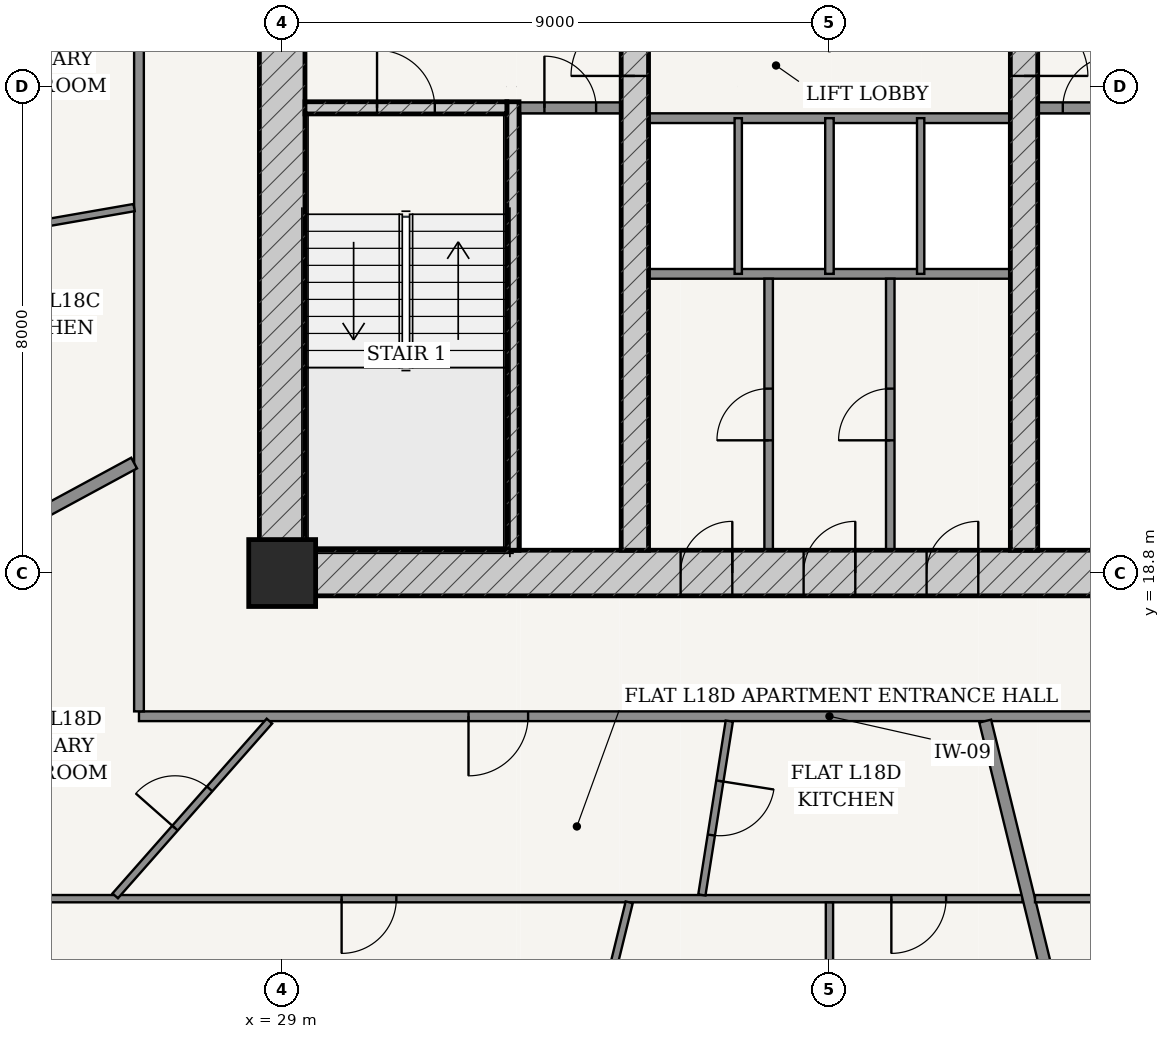
"""IFC4 building model, lengths in metres.
Left out: names, types, materials, properties, quantities, classifications, styles, units other than length and angle.
Written with IfcOpenShell. Run it as: python <this file> out.ifc"""

import sys

from ifc_helpers import new_model, si_unit, direction, frame, frame_2d, origin, origin_2d, place, context, subcontext, project, spatial, rectangle, extrude, source, transform, mapped, element, fill, save


model = new_model("IFC4")
c1 = context("Model", 3, precision=1e-05, world=origin(), true_north=direction((-0.2419218956, 0.970295726276)))
c2 = subcontext(c1, "Body", "Model", "MODEL_VIEW")
j1 = project(units=[si_unit("LENGTHUNIT", "METRE"), si_unit("PLANEANGLEUNIT", "RADIAN")], contexts=[c1])
p1 = place(None, origin())
s1 = spatial("IfcSite", under=j1, at=p1, CompositionType="ELEMENT")
p2 = place(p1, origin())
s2 = spatial("IfcBuilding", under=s1, at=p2, CompositionType="ELEMENT")
p3 = place(p2, frame((0.0, 0.0, 70.8)))
s3 = spatial("IfcBuildingStorey", under=s2, at=p3, CompositionType="ELEMENT", Elevation=70.8)
p4 = place(p3, frame((29.0, 18.8, 0.0), z_axis=(0.0, 0.0, 1.0), x_axis=(1.0, 0.0, 0.0)))
e1 = element("IfcColumn", 1, at=p4, inside=s3, PredefinedType="COLUMN", context=c2, shape_type="SweptSolid", body=[
    extrude(rectangle(XDim=1.1, YDim=1.1, at=origin_2d()), origin(), (0.0, 0.0, 1.0), 3.6),
])
p5 = place(p3, frame((28.625, 18.8, 0.0), z_axis=(0.0, 0.0, 1.0), x_axis=(1.0, 0.0, 0.0)))
e2 = element("IfcWall", 2, at=p5, inside=s3, PredefinedType="SHEAR", context=c2, shape_type="SweptSolid", body=[
    extrude(rectangle(XDim=18.75, YDim=0.75, at=frame_2d((9.375, 0.0))), origin(), (0.0, 0.0, 1.0), 3.15),
])
p6 = place(p5, frame((6.927, 0.0, 0.0)))
e3 = element("IfcOpeningElement", 3, at=p6, cuts=e2, PredefinedType="OPENING", context=c2, shape_type="SweptSolid", body=[
    extrude(rectangle(XDim=0.85, YDim=2.1, at=frame_2d((0.425, 1.05))), frame((0.0, 0.385, 0.0), z_axis=(0.0, -1.0, 0.0), x_axis=(1.0, 0.0, 0.0)), (0.0, 0.0, 1.0), 0.77),
])
p7 = place(p5, frame((8.95, 0.0, 0.0)))
e4 = element("IfcOpeningElement", 4, at=p7, cuts=e2, PredefinedType="OPENING", context=c2, shape_type="SweptSolid", body=[
    extrude(rectangle(XDim=0.85, YDim=2.1, at=frame_2d((0.425, 1.05))), frame((0.0, 0.385, 0.0), z_axis=(0.0, -1.0, 0.0), x_axis=(1.0, 0.0, 0.0)), (0.0, 0.0, 1.0), 0.77),
])
p8 = place(p5, frame((10.972, 0.0, 0.0)))
e5 = element("IfcOpeningElement", 5, at=p8, cuts=e2, PredefinedType="OPENING", context=c2, shape_type="SweptSolid", body=[
    extrude(rectangle(XDim=0.85, YDim=2.1, at=frame_2d((0.425, 1.05))), frame((0.0, 0.385, 0.0), z_axis=(0.0, -1.0, 0.0), x_axis=(1.0, 0.0, 0.0)), (0.0, 0.0, 1.0), 0.77),
])
p9 = place(p3, frame((29.0, 19.175, 0.0), z_axis=(0.0, 0.0, 1.0), x_axis=(0.0, 1.0, 0.0)))
e6 = element("IfcWall", 6, at=p9, inside=s3, PredefinedType="SHEAR", context=c2, shape_type="SweptSolid", body=[
    extrude(rectangle(XDim=15.25, YDim=0.75, at=frame_2d((7.625, 0.0))), origin(), (0.0, 0.0, 1.0), 3.15),
])
p10 = place(p9, frame((9.875, 0.0, 0.0)))
e7 = element("IfcOpeningElement", 7, at=p10, cuts=e6, PredefinedType="OPENING", context=c2, shape_type="SweptSolid", body=[
    extrude(rectangle(XDim=1.5, YDim=2.2, at=frame_2d((0.75, 1.1))), frame((0.0, 0.385, 0.0), z_axis=(0.0, -1.0, 0.0), x_axis=(1.0, 0.0, 0.0)), (0.0, 0.0, 1.0), 0.77),
])
p11 = place(p3, frame((32.795, 19.175, 0.0), z_axis=(0.0, 0.0, 1.0), x_axis=(0.0, 1.0, 0.0)))
e8 = element("IfcWall", 8, at=p11, inside=s3, PredefinedType="SOLIDWALL", context=c2, shape_type="SweptSolid", body=[
    extrude(rectangle(XDim=7.375, YDim=0.2, at=frame_2d((3.688, 0.0))), origin(), (0.0, 0.0, 1.0), 3.15),
])
p12 = place(p3, frame((29.375, 26.45, 0.0), z_axis=(0.0, 0.0, 1.0), x_axis=(1.0, 0.0, 0.0)))
e9 = element("IfcWall", 9, at=p12, inside=s3, PredefinedType="SOLIDWALL", context=c2, shape_type="SweptSolid", body=[
    extrude(rectangle(XDim=3.32, YDim=0.2, at=frame_2d((1.66, 0.0))), origin(), (0.0, 0.0, 1.0), 3.15),
])
p13 = place(p12, frame((1.185, 0.0, 0.0)))
e10 = element("IfcOpeningElement", 10, at=p13, cuts=e9, PredefinedType="OPENING", context=c2, shape_type="SweptSolid", body=[
    extrude(rectangle(XDim=0.95, YDim=2.15, at=frame_2d((0.475, 1.075))), frame((0.0, 0.11, 0.0), z_axis=(0.0, -1.0, 0.0), x_axis=(1.0, 0.0, 0.0)), (0.0, 0.0, 1.0), 0.22),
])
p14 = place(p3, frame((34.8, 19.175, 0.0), z_axis=(0.0, 0.0, 1.0), x_axis=(0.0, 1.0, 0.0)))
e11 = element("IfcWall", 11, at=p14, inside=s3, PredefinedType="SHEAR", context=c2, shape_type="SweptSolid", body=[
    extrude(rectangle(XDim=15.25, YDim=0.45, at=frame_2d((7.625, 0.0))), origin(), (0.0, 0.0, 1.0), 3.15),
])
p15 = place(p14, frame((7.8, 0.0, 0.0)))
e12 = element("IfcOpeningElement", 12, at=p15, cuts=e11, PredefinedType="OPENING", context=c2, shape_type="SweptSolid", body=[
    extrude(rectangle(XDim=1.05, YDim=2.15, at=frame_2d((0.525, 1.075))), frame((0.0, 0.235, 0.0), z_axis=(0.0, -1.0, 0.0), x_axis=(1.0, 0.0, 0.0)), (0.0, 0.0, 1.0), 0.47),
])
p16 = place(p3, frame((41.2, 19.175, 0.0), z_axis=(0.0, 0.0, 1.0), x_axis=(0.0, 1.0, 0.0)))
e13 = element("IfcWall", 13, at=p16, inside=s3, PredefinedType="SHEAR", context=c2, shape_type="SweptSolid", body=[
    extrude(rectangle(XDim=15.25, YDim=0.45, at=frame_2d((7.625, 0.0))), origin(), (0.0, 0.0, 1.0), 3.15),
])
p17 = place(p16, frame((7.8, 0.0, 0.0)))
e14 = element("IfcOpeningElement", 14, at=p17, cuts=e13, PredefinedType="OPENING", context=c2, shape_type="SweptSolid", body=[
    extrude(rectangle(XDim=1.05, YDim=2.15, at=frame_2d((0.525, 1.075))), frame((0.0, 0.235, 0.0), z_axis=(0.0, -1.0, 0.0), x_axis=(1.0, 0.0, 0.0)), (0.0, 0.0, 1.0), 0.47),
])
p18 = place(p3, frame((32.9, 26.45, 0.0), z_axis=(0.0, 0.0, 1.0), x_axis=(1.0, 0.0, 0.0)))
e15 = element("IfcWall", 15, at=p18, inside=s3, PredefinedType="PARTITIONING", context=c2, shape_type="SweptSolid", body=[
    extrude(rectangle(XDim=1.675, YDim=0.18, at=frame_2d((0.837, 0.0))), origin(), (0.0, 0.0, 1.0), 3.15),
])
p19 = place(p18, frame((0.413, 0.0, 0.0)))
e16 = element("IfcOpeningElement", 16, at=p19, cuts=e15, PredefinedType="OPENING", context=c2, shape_type="SweptSolid", body=[
    extrude(rectangle(XDim=0.85, YDim=2.1, at=frame_2d((0.425, 1.05))), frame((0.0, 0.1, 0.0), z_axis=(0.0, -1.0, 0.0), x_axis=(1.0, 0.0, 0.0)), (0.0, 0.0, 1.0), 0.2),
])
p20 = place(p3, frame((41.425, 26.45, 0.0), z_axis=(0.0, 0.0, 1.0), x_axis=(1.0, 0.0, 0.0)))
e17 = element("IfcWall", 17, at=p20, inside=s3, PredefinedType="PARTITIONING", context=c2, shape_type="SweptSolid", body=[
    extrude(rectangle(XDim=1.675, YDim=0.18, at=frame_2d((0.837, 0.0))), origin(), (0.0, 0.0, 1.0), 3.15),
])
p21 = place(p20, frame((0.413, 0.0, 0.0)))
e18 = element("IfcOpeningElement", 18, at=p21, cuts=e17, PredefinedType="OPENING", context=c2, shape_type="SweptSolid", body=[
    extrude(rectangle(XDim=0.85, YDim=2.1, at=frame_2d((0.425, 1.05))), frame((0.0, 0.1, 0.0), z_axis=(0.0, -1.0, 0.0), x_axis=(1.0, 0.0, 0.0)), (0.0, 0.0, 1.0), 0.2),
])
for number, where, z_axis, x_axis in (
    (19, (35.025, 26.28, 0.0), (0.0, 0.0, 1.0), (1.0, 0.0, 0.0)),
    (20, (35.025, 23.72, 0.0), (0.0, 0.0, 1.0), (1.0, 0.0, 0.0)),
):
    element("IfcWall", number, at=place(p3, frame(where, z_axis=z_axis, x_axis=x_axis)), inside=s3, PredefinedType="PARTITIONING", context=c2, shape_type="SweptSolid", body=[
        extrude(rectangle(XDim=5.95, YDim=0.16, at=frame_2d((2.975, 0.0))), origin(), (0.0, 0.0, 1.0), 3.15),
    ])
p22 = place(p3, frame((36.5, 23.72, 0.0), z_axis=(0.0, 0.0, 1.0), x_axis=(0.0, 1.0, 0.0)))
e21 = element("IfcWall", 21, at=p22, inside=s3, PredefinedType="PARTITIONING", context=c2, shape_type="SweptSolid", body=[
    extrude(rectangle(XDim=2.56, YDim=0.12, at=frame_2d((1.28, 0.0))), origin(), (0.0, 0.0, 1.0), 3.15),
])
p23 = place(p3, frame((38.0, 23.72, 0.0), z_axis=(0.0, 0.0, 1.0), x_axis=(0.0, 1.0, 0.0)))
e22 = element("IfcWall", 22, at=p23, inside=s3, PredefinedType="PARTITIONING", context=c2, shape_type="SweptSolid", body=[
    extrude(rectangle(XDim=2.56, YDim=0.14, at=frame_2d((1.28, 0.0))), origin(), (0.0, 0.0, 1.0), 3.15),
])
p24 = place(p3, frame((39.5, 23.72, 0.0), z_axis=(0.0, 0.0, 1.0), x_axis=(0.0, 1.0, 0.0)))
e23 = element("IfcWall", 23, at=p24, inside=s3, PredefinedType="PARTITIONING", context=c2, shape_type="SweptSolid", body=[
    extrude(rectangle(XDim=2.56, YDim=0.12, at=frame_2d((1.28, 0.0))), origin(), (0.0, 0.0, 1.0), 3.15),
])
p25 = place(p3, frame((37.0, 19.175, 0.0), z_axis=(0.0, 0.0, 1.0), x_axis=(0.0, 1.0, 0.0)))
e24 = element("IfcWall", 24, at=p25, inside=s3, PredefinedType="PARTITIONING", context=c2, shape_type="SweptSolid", body=[
    extrude(rectangle(XDim=4.465, YDim=0.14, at=frame_2d((2.232, 0.0))), origin(), (0.0, 0.0, 1.0), 3.15),
])
p26 = place(p25, frame((1.808, 0.0, 0.0)))
e25 = element("IfcOpeningElement", 25, at=p26, cuts=e24, PredefinedType="OPENING", context=c2, shape_type="SweptSolid", body=[
    extrude(rectangle(XDim=0.85, YDim=2.1, at=frame_2d((0.425, 1.05))), frame((0.0, 0.08, 0.0), z_axis=(0.0, -1.0, 0.0), x_axis=(1.0, 0.0, 0.0)), (0.0, 0.0, 1.0), 0.16),
])
p27 = place(p3, frame((39.0, 19.175, 0.0), z_axis=(0.0, 0.0, 1.0), x_axis=(0.0, 1.0, 0.0)))
e26 = element("IfcWall", 26, at=p27, inside=s3, PredefinedType="PARTITIONING", context=c2, shape_type="SweptSolid", body=[
    extrude(rectangle(XDim=4.465, YDim=0.14, at=frame_2d((2.232, 0.0))), origin(), (0.0, 0.0, 1.0), 3.15),
])
p28 = place(p27, frame((1.808, 0.0, 0.0)))
e27 = element("IfcOpeningElement", 27, at=p28, cuts=e26, PredefinedType="OPENING", context=c2, shape_type="SweptSolid", body=[
    extrude(rectangle(XDim=0.85, YDim=2.1, at=frame_2d((0.425, 1.05))), frame((0.0, 0.08, 0.0), z_axis=(0.0, -1.0, 0.0), x_axis=(1.0, 0.0, 0.0)), (0.0, 0.0, 1.0), 0.16),
])
p29 = place(p3, frame((26.645, 16.445, 0.0), z_axis=(0.0, 0.0, 1.0), x_axis=(1.0, 0.0, 0.0)))
e28 = element("IfcWall", 28, at=p29, inside=s3, PredefinedType="PARTITIONING", context=c2, shape_type="SweptSolid", body=[
    extrude(rectangle(XDim=22.71, YDim=0.16, at=frame_2d((11.355, 0.0))), origin(), (0.0, 0.0, 1.0), 2.596),
])
p30 = place(p29, frame((5.419, 0.0, 0.0)))
e29 = element("IfcOpeningElement", 29, at=p30, cuts=e28, PredefinedType="OPENING", context=c2, shape_type="SweptSolid", body=[
    extrude(rectangle(XDim=0.98, YDim=2.2, at=frame_2d((0.49, 1.1))), frame((0.0, 0.09, 0.0), z_axis=(0.0, -1.0, 0.0), x_axis=(1.0, 0.0, 0.0)), (0.0, 0.0, 1.0), 0.18),
])
p31 = place(p3, frame((26.645, 16.525, 0.0), z_axis=(0.0, 0.0, 1.0), x_axis=(0.0, 1.0, 0.0)))
e30 = element("IfcWall", 30, at=p31, inside=s3, PredefinedType="PARTITIONING", context=c2, shape_type="SweptSolid", body=[
    extrude(rectangle(XDim=20.55, YDim=0.16, at=frame_2d((10.275, 0.0))), origin(), (0.0, 0.0, 1.0), 2.596),
])
p32 = place(p31, frame((16.199, 0.0, 0.0)))
e31 = element("IfcOpeningElement", 31, at=p32, cuts=e30, PredefinedType="OPENING", context=c2, shape_type="SweptSolid", body=[
    extrude(rectangle(XDim=0.98, YDim=2.2, at=frame_2d((0.49, 1.1))), frame((0.0, 0.09, 0.0), z_axis=(0.0, -1.0, 0.0), x_axis=(1.0, 0.0, 0.0)), (0.0, 0.0, 1.0), 0.18),
])
p33 = place(p3, frame((26.565, 24.81, 0.0), z_axis=(0.0, 0.0, 1.0), x_axis=(-0.985190752909, -0.171461891924, 0.0)))
e32 = element("IfcWall", 32, at=p33, inside=s3, PredefinedType="PARTITIONING", context=c2, shape_type="SweptSolid", body=[
    extrude(rectangle(XDim=2.902, YDim=0.12, at=frame_2d((1.451, 0.0))), origin(), (0.0, 0.0, 1.0), 2.596),
])
p34 = place(p3, frame((26.565, 20.608, 0.0), z_axis=(0.0, 0.0, 1.0), x_axis=(-0.879369737803, -0.476139542819, 0.0)))
e33 = element("IfcWall", 33, at=p34, inside=s3, PredefinedType="PARTITIONING", context=c2, shape_type="SweptSolid", body=[
    extrude(rectangle(XDim=14.295, YDim=0.2, at=frame_2d((7.147, 0.0))), origin(), (0.0, 0.0, 1.0), 2.5),
])
p35 = place(p3, frame((41.176, 13.445, 0.0), z_axis=(0.0, 0.0, 1.0), x_axis=(-1.0, 0.0, 0.0)))
e34 = element("IfcWall", 34, at=p35, inside=s3, PredefinedType="PARTITIONING", context=c2, shape_type="SweptSolid", body=[
    extrude(rectangle(XDim=17.531, YDim=0.12, at=frame_2d((8.766, 0.0))), origin(), (0.0, 0.0, 1.0), 2.596),
])
p36 = place(p35, frame((10.299, 0.0, 0.0)))
e35 = element("IfcOpeningElement", 35, at=p36, cuts=e34, PredefinedType="OPENING", context=c2, shape_type="SweptSolid", body=[
    extrude(rectangle(XDim=0.9, YDim=2.15, at=frame_2d((0.45, 1.075))), frame((0.0, 0.07, 0.0), z_axis=(0.0, -1.0, 0.0), x_axis=(1.0, 0.0, 0.0)), (0.0, 0.0, 1.0), 0.14),
])
p37 = place(p35, frame((1.258, 0.0, 0.0)))
e36 = element("IfcOpeningElement", 36, at=p37, cuts=e34, PredefinedType="OPENING", context=c2, shape_type="SweptSolid", body=[
    extrude(rectangle(XDim=0.9, YDim=2.15, at=frame_2d((0.45, 1.075))), frame((0.0, 0.07, 0.0), z_axis=(0.0, -1.0, 0.0), x_axis=(1.0, 0.0, 0.0)), (0.0, 0.0, 1.0), 0.14),
])
p38 = place(p3, frame((34.707, 13.385, 0.0), z_axis=(0.0, 0.0, 1.0), x_axis=(-0.238386763388, -0.971170299711, 0.0)))
e37 = element("IfcWall", 37, at=p38, inside=s3, PredefinedType="PARTITIONING", context=c2, shape_type="SweptSolid", body=[
    extrude(rectangle(XDim=9.808, YDim=0.12, at=frame_2d((4.904, 0.0))), origin(), (0.0, 0.0, 1.0), 2.5),
])
p39 = place(p3, frame((38.0, 13.383, 0.0), z_axis=(0.0, 0.0, 1.0), x_axis=(0.0, -1.0, 0.0)))
e38 = element("IfcWall", 38, at=p39, inside=s3, PredefinedType="PARTITIONING", context=c2, shape_type="SweptSolid", body=[
    extrude(rectangle(XDim=10.023, YDim=0.12, at=frame_2d((5.011, 0.0))), origin(), (0.0, 0.0, 1.0), 2.666),
])
p40 = place(p39, frame((4.562, 0.0, 0.0)))
e39 = element("IfcOpeningElement", 39, at=p40, cuts=e38, PredefinedType="OPENING", context=c2, shape_type="SweptSolid", body=[
    extrude(rectangle(XDim=0.9, YDim=2.15, at=frame_2d((0.45, 1.075))), frame((0.0, 0.07, 0.0), z_axis=(0.0, -1.0, 0.0), x_axis=(1.0, 0.0, 0.0)), (0.0, 0.0, 1.0), 0.14),
])
p41 = place(p3, frame((28.79, 16.365, 0.0), z_axis=(0.0, 0.0, 1.0), x_axis=(-0.661718545222, -0.749752337048, 0.0)))
e40 = element("IfcWall", 40, at=p41, inside=s3, PredefinedType="PARTITIONING", context=c2, shape_type="SweptSolid", body=[
    extrude(rectangle(XDim=3.833, YDim=0.12, at=frame_2d((1.917, 0.0))), origin(), (0.0, 0.0, 1.0), 2.596),
])
p42 = place(p41, frame((1.486, 0.0, 0.0)))
e41 = element("IfcOpeningElement", 41, at=p42, cuts=e40, PredefinedType="OPENING", context=c2, shape_type="SweptSolid", body=[
    extrude(rectangle(XDim=0.86, YDim=2.15, at=frame_2d((0.43, 1.075))), frame((0.0, 0.07, 0.0), z_axis=(0.0, -1.0, 0.0), x_axis=(1.0, 0.0, 0.0)), (0.0, 0.0, 1.0), 0.14),
])
p43 = place(p3, frame((36.353, 16.365, 0.0), z_axis=(0.0, 0.0, 1.0), x_axis=(-0.155897593005, -0.987773223212, 0.0)))
e42 = element("IfcWall", 42, at=p43, inside=s3, PredefinedType="PARTITIONING", context=c2, shape_type="SweptSolid", body=[
    extrude(rectangle(XDim=2.894, YDim=0.12, at=frame_2d((1.447, 0.0))), origin(), (0.0, 0.0, 1.0), 3.15),
])
p44 = place(p43, frame((0.997, 0.0, 0.0)))
e43 = element("IfcOpeningElement", 43, at=p44, cuts=e42, PredefinedType="OPENING", context=c2, shape_type="SweptSolid", body=[
    extrude(rectangle(XDim=0.9, YDim=2.15, at=frame_2d((0.45, 1.075))), frame((0.0, 0.07, 0.0), z_axis=(0.0, -1.0, 0.0), x_axis=(1.0, 0.0, 0.0)), (0.0, 0.0, 1.0), 0.14),
])
p45 = place(p3, frame((40.562, 16.365, 0.0), z_axis=(0.0, 0.0, 1.0), x_axis=(0.238380116209, -0.971171931326, 0.0)))
e44 = element("IfcWall", 44, at=p45, inside=s3, PredefinedType="PARTITIONING", context=c2, shape_type="SweptSolid", body=[
    extrude(rectangle(XDim=12.877, YDim=0.2, at=frame_2d((6.438, 0.0))), origin(), (0.0, 0.0, 1.0), 2.5),
])
p46 = place(p3, frame((52.355, 13.445, 0.0), z_axis=(0.0, 0.0, 1.0), x_axis=(-1.0, 0.0, 0.0)))
e45 = element("IfcWall", 45, at=p46, inside=s3, PredefinedType="PARTITIONING", context=c2, shape_type="SweptSolid", body=[
    extrude(rectangle(XDim=10.975, YDim=0.12, at=frame_2d((5.487, 0.0))), origin(), (0.0, 0.0, 1.0), 2.596),
])
m1 = source(origin(), c2, "Body", "SweptSolid", [
    extrude(rectangle(XDim=1.05, YDim=2.15, at=frame_2d((0.525, 1.075))), frame((0.0, 0.025, 0.0), z_axis=(0.0, -1.0, 0.0), x_axis=(1.0, 0.0, 0.0)), (0.0, 0.0, 1.0), 0.05),
])
p47 = place(p15, origin())
e46 = element("IfcDoor", 46, at=p47, inside=s3, OperationType="SINGLE_SWING_LEFT", PredefinedType="DOOR", context=c2, shape_type="MappedRepresentation", body=[
    mapped(m1, transform((0.0, 0.0, 0.0), scale=1.0)),
])
fill(e12, e46)
p48 = place(p17, frame((1.05, 0.0, 0.0), z_axis=(0.0, 0.0, 1.0), x_axis=(-1.0, 0.0, 0.0)))
e47 = element("IfcDoor", 47, at=p48, inside=s3, OperationType="SINGLE_SWING_RIGHT", PredefinedType="DOOR", context=c2, shape_type="MappedRepresentation", body=[
    mapped(m1, transform((0.0, 0.0, 0.0), scale=1.0)),
])
fill(e14, e47)
m2 = source(origin(), c2, "Body", "SweptSolid", [
    extrude(rectangle(XDim=0.95, YDim=2.15, at=frame_2d((0.475, 1.075))), frame((0.0, 0.025, 0.0), z_axis=(0.0, -1.0, 0.0), x_axis=(1.0, 0.0, 0.0)), (0.0, 0.0, 1.0), 0.05),
])
p49 = place(p13, origin())
e48 = element("IfcDoor", 48, at=p49, inside=s3, OperationType="SINGLE_SWING_LEFT", PredefinedType="DOOR", context=c2, shape_type="MappedRepresentation", body=[
    mapped(m2, transform((0.0, 0.0, 0.0), scale=1.0)),
])
fill(e10, e48)
m3 = source(origin(), c2, "Body", "SweptSolid", [
    extrude(rectangle(XDim=0.85, YDim=2.1, at=frame_2d((0.425, 1.05))), frame((0.0, 0.025, 0.0), z_axis=(0.0, -1.0, 0.0), x_axis=(1.0, 0.0, 0.0)), (0.0, 0.0, 1.0), 0.05),
])
p50 = place(p19, origin())
e49 = element("IfcDoor", 49, at=p50, inside=s3, OperationType="SINGLE_SWING_LEFT", PredefinedType="DOOR", context=c2, shape_type="MappedRepresentation", body=[
    mapped(m3, transform((0.0, 0.0, 0.0), scale=1.0)),
])
fill(e16, e49)
p51 = place(p21, origin())
e50 = element("IfcDoor", 50, at=p51, inside=s3, OperationType="SINGLE_SWING_RIGHT", PredefinedType="DOOR", context=c2, shape_type="MappedRepresentation", body=[
    mapped(m3, transform((0.0, 0.0, 0.0), scale=1.0)),
])
fill(e18, e50)
p52 = place(p6, origin())
e51 = element("IfcDoor", 51, at=p52, inside=s3, OperationType="SINGLE_SWING_RIGHT", PredefinedType="DOOR", context=c2, shape_type="MappedRepresentation", body=[
    mapped(m3, transform((0.0, 0.0, 0.0), scale=1.0)),
])
fill(e3, e51)
p53 = place(p7, origin())
e52 = element("IfcDoor", 52, at=p53, inside=s3, OperationType="SINGLE_SWING_RIGHT", PredefinedType="DOOR", context=c2, shape_type="MappedRepresentation", body=[
    mapped(m3, transform((0.0, 0.0, 0.0), scale=1.0)),
])
fill(e4, e52)
p54 = place(p8, origin())
e53 = element("IfcDoor", 53, at=p54, inside=s3, OperationType="SINGLE_SWING_RIGHT", PredefinedType="DOOR", context=c2, shape_type="MappedRepresentation", body=[
    mapped(m3, transform((0.0, 0.0, 0.0), scale=1.0)),
])
fill(e5, e53)
p55 = place(p26, origin())
e54 = element("IfcDoor", 54, at=p55, inside=s3, OperationType="SINGLE_SWING_LEFT", PredefinedType="DOOR", context=c2, shape_type="MappedRepresentation", body=[
    mapped(m3, transform((0.0, 0.0, 0.0), scale=1.0)),
])
fill(e25, e54)
p56 = place(p28, origin())
e55 = element("IfcDoor", 55, at=p56, inside=s3, OperationType="SINGLE_SWING_LEFT", PredefinedType="DOOR", context=c2, shape_type="MappedRepresentation", body=[
    mapped(m3, transform((0.0, 0.0, 0.0), scale=1.0)),
])
fill(e27, e55)
m4 = source(origin(), c2, "Body", "SweptSolid", [
    extrude(rectangle(XDim=0.98, YDim=2.2, at=frame_2d((0.49, 1.1))), frame((0.0, 0.025, 0.0), z_axis=(0.0, -1.0, 0.0), x_axis=(1.0, 0.0, 0.0)), (0.0, 0.0, 1.0), 0.05),
])
p57 = place(p30, frame((0.98, 0.0, 0.0), z_axis=(0.0, 0.0, 1.0), x_axis=(-1.0, 0.0, 0.0)))
e56 = element("IfcDoor", 56, at=p57, inside=s3, OperationType="SINGLE_SWING_RIGHT", PredefinedType="DOOR", context=c2, shape_type="MappedRepresentation", body=[
    mapped(m4, transform((0.0, 0.0, 0.0), scale=1.0)),
])
fill(e29, e56)
m5 = source(origin(), c2, "Body", "SweptSolid", [
    extrude(rectangle(XDim=0.86, YDim=2.15, at=frame_2d((0.43, 1.075))), frame((0.0, 0.025, 0.0), z_axis=(0.0, -1.0, 0.0), x_axis=(1.0, 0.0, 0.0)), (0.0, 0.0, 1.0), 0.05),
])
p58 = place(p42, frame((0.86, 0.0, 0.0), z_axis=(0.0, 0.0, 1.0), x_axis=(-1.0, 0.0, 0.0)))
e57 = element("IfcDoor", 57, at=p58, inside=s3, OperationType="SINGLE_SWING_LEFT", PredefinedType="DOOR", context=c2, shape_type="MappedRepresentation", body=[
    mapped(m5, transform((0.0, 0.0, 0.0), scale=1.0)),
])
fill(e41, e57)
m6 = source(origin(), c2, "Body", "SweptSolid", [
    extrude(rectangle(XDim=0.9, YDim=2.15, at=frame_2d((0.45, 1.075))), frame((0.0, 0.025, 0.0), z_axis=(0.0, -1.0, 0.0), x_axis=(1.0, 0.0, 0.0)), (0.0, 0.0, 1.0), 0.05),
])
p59 = place(p36, origin())
e58 = element("IfcDoor", 58, at=p59, inside=s3, OperationType="SINGLE_SWING_RIGHT", PredefinedType="DOOR", context=c2, shape_type="MappedRepresentation", body=[
    mapped(m6, transform((0.0, 0.0, 0.0), scale=1.0)),
])
fill(e35, e58)
p60 = place(p44, origin())
e59 = element("IfcDoor", 59, at=p60, inside=s3, OperationType="SINGLE_SWING_LEFT", PredefinedType="DOOR", context=c2, shape_type="MappedRepresentation", body=[
    mapped(m6, transform((0.0, 0.0, 0.0), scale=1.0)),
])
fill(e43, e59)
p61 = place(p37, origin())
e60 = element("IfcDoor", 60, at=p61, inside=s3, OperationType="SINGLE_SWING_RIGHT", PredefinedType="DOOR", context=c2, shape_type="MappedRepresentation", body=[
    mapped(m6, transform((0.0, 0.0, 0.0), scale=1.0)),
])
fill(e36, e60)
save(model, sys.argv[1])
